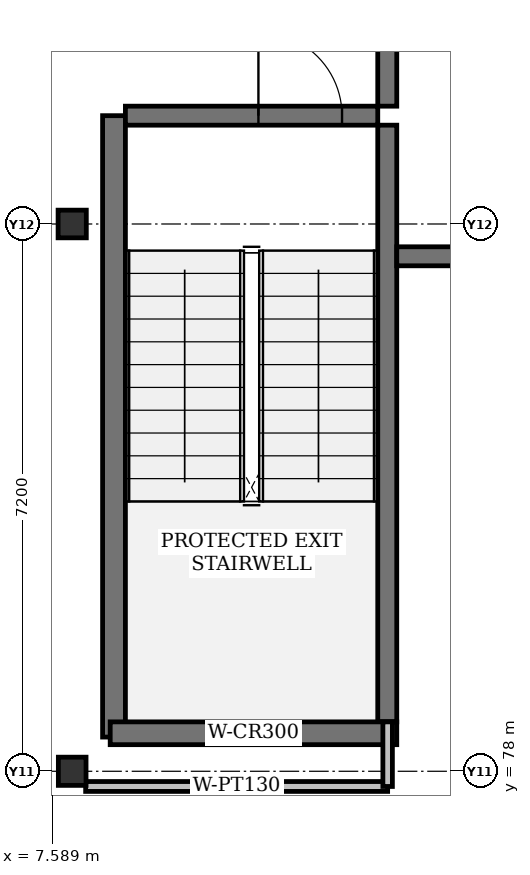
"""IFC4 building model, lengths in metres.
Left out: names, types, materials, properties, quantities, classifications, styles, units other than length and angle.
Written with IfcOpenShell. Run it as: python <this file> out.ifc"""

import sys

from ifc_helpers import new_model, si_unit, direction, frame, frame_2d, origin, origin_2d, place, context, subcontext, project, spatial, rectangle, i_section, extrude, element, fill, save


model = new_model("IFC4")
c1 = context("Model", 3, precision=1e-05, world=origin(), true_north=direction((0.0, 1.0)))
c2 = subcontext(c1, "Body", "Model", "MODEL_VIEW")
j1 = project(units=[si_unit("LENGTHUNIT", "METRE"), si_unit("PLANEANGLEUNIT", "RADIAN")], contexts=[c1])
p1 = place(None, origin())
s1 = spatial("IfcSite", under=j1, at=p1, CompositionType="ELEMENT")
p2 = place(p1, origin())
s2 = spatial("IfcBuilding", under=s1, at=p2, CompositionType="ELEMENT")
p3 = place(p2, frame((0.0, 0.0, 43.5)))
s3 = spatial("IfcBuildingStorey", under=s2, at=p3, CompositionType="ELEMENT", Elevation=43.5)
for number, where, z_axis, x_axis in (
    (1, (7.85, 78.0, 0.0), (0.0, 0.0, 1.0), (0.0, 1.0, 0.0)),
    (2, (7.85, 85.2, 0.0), (0.0, 0.0, 1.0), (1.0, 0.0, 0.0)),
):
    element("IfcColumn", number, at=place(p3, frame(where, z_axis=z_axis, x_axis=x_axis)), inside=s3, PredefinedType="COLUMN", context=c2, shape_type="SweptSolid", body=[
        extrude(i_section(OverallWidth=0.371, OverallDepth=0.364, WebThickness=0.013, FlangeThickness=0.022, FilletRadius=0.015, at=origin_2d()), origin(), (0.0, 0.0, 1.0), 4.2),
    ])
p4 = place(p3, frame((8.4, 78.45, 0.0), z_axis=(0.0, 0.0, 1.0), x_axis=(0.0, 1.0, 0.0)))
e3 = element("IfcWall", 3, at=p4, inside=s3, PredefinedType="SHEAR", context=c2, shape_type="SweptSolid", body=[
    extrude(rectangle(XDim=8.175, YDim=0.3, at=frame_2d((4.087, 0.0))), origin(), (0.0, 0.0, 1.0), 4.2),
])
p5 = place(p3, frame((11.995, 78.65, 0.0), z_axis=(0.0, 0.0, 1.0), x_axis=(0.0, 1.0, 0.0)))
e4 = element("IfcWall", 4, at=p5, inside=s3, PredefinedType="SHEAR", context=c2, shape_type="SweptSolid", body=[
    extrude(rectangle(XDim=7.85, YDim=0.25, at=frame_2d((3.925, 0.0))), origin(), (0.0, 0.0, 1.0), 4.2),
])
p6 = place(p3, frame((11.995, 86.75, 0.0), z_axis=(0.0, 0.0, 1.0), x_axis=(0.0, 1.0, 0.0)))
e5 = element("IfcWall", 5, at=p6, inside=s3, PredefinedType="SHEAR", context=c2, shape_type="SweptSolid", body=[
    extrude(rectangle(XDim=3.9, YDim=0.25, at=frame_2d((1.95, 0.0))), origin(), (0.0, 0.0, 1.0), 4.2),
])
p7 = place(p6, frame((1.3, 0.0, 0.0)))
e6 = element("IfcOpeningElement", 6, at=p7, cuts=e5, PredefinedType="OPENING", context=c2, shape_type="SweptSolid", body=[
    extrude(rectangle(XDim=1.25, YDim=2.2, at=frame_2d((0.625, 1.1))), frame((0.0, 0.125, 0.0), z_axis=(0.0, -1.0, 0.0), x_axis=(1.0, 0.0, 0.0)), (0.0, 0.0, 1.0), 0.25),
])
p8 = place(p3, frame((8.35, 78.5, 0.0), z_axis=(0.0, 0.0, 1.0), x_axis=(1.0, 0.0, 0.0)))
e7 = element("IfcWall", 7, at=p8, inside=s3, PredefinedType="SHEAR", context=c2, shape_type="SweptSolid", body=[
    extrude(rectangle(XDim=3.77, YDim=0.3, at=frame_2d((1.885, 0.0))), origin(), (0.0, 0.0, 1.0), 4.2),
])
p9 = place(p3, frame((8.55, 86.625, 0.0), z_axis=(0.0, 0.0, 1.0), x_axis=(1.0, 0.0, 0.0)))
e8 = element("IfcWall", 8, at=p9, inside=s3, PredefinedType="SHEAR", context=c2, shape_type="SweptSolid", body=[
    extrude(rectangle(XDim=3.32, YDim=0.25, at=frame_2d((1.66, 0.0))), origin(), (0.0, 0.0, 1.0), 4.2),
])
p10 = place(p9, frame((1.75, 0.0, 0.0)))
e9 = element("IfcOpeningElement", 9, at=p10, cuts=e8, PredefinedType="OPENING", context=c2, shape_type="SweptSolid", body=[
    extrude(rectangle(XDim=1.1, YDim=2.15, at=frame_2d((0.55, 1.075))), frame((0.0, 0.125, 0.0), z_axis=(0.0, -1.0, 0.0), x_axis=(1.0, 0.0, 0.0)), (0.0, 0.0, 1.0), 0.25),
])
p11 = place(p3, frame((12.12, 84.775, 0.0), z_axis=(0.0, 0.0, 1.0), x_axis=(1.0, 0.0, 0.0)))
e10 = element("IfcWall", 10, at=p11, inside=s3, PredefinedType="SHEAR", context=c2, shape_type="SweptSolid", body=[
    extrude(rectangle(XDim=4.03, YDim=0.25, at=frame_2d((2.015, 0.0))), origin(), (0.0, 0.0, 1.0), 4.2),
])
p12 = place(p11, frame((1.3, 0.0, 0.0)))
e11 = element("IfcOpeningElement", 11, at=p12, cuts=e10, PredefinedType="OPENING", context=c2, shape_type="SweptSolid", body=[
    extrude(rectangle(XDim=1.4, YDim=2.25, at=frame_2d((0.7, 1.125))), frame((0.0, 0.125, 0.0), z_axis=(0.0, -1.0, 0.0), x_axis=(1.0, 0.0, 0.0)), (0.0, 0.0, 1.0), 0.25),
])
p13 = place(p3, frame((8.027, 77.8, 0.0), z_axis=(0.0, 0.0, 1.0), x_axis=(1.0, 0.0, 0.0)))
e12 = element("IfcWall", 12, at=p13, inside=s3, PredefinedType="PARTITIONING", context=c2, shape_type="SweptSolid", body=[
    extrude(rectangle(XDim=3.973, YDim=0.13, at=frame_2d((1.986, 0.0))), origin(), (0.0, 0.0, 1.0), 3.426),
])
p14 = place(p3, frame((12.0, 77.8, 0.0), z_axis=(0.0, 0.0, 1.0), x_axis=(0.0, 1.0, 0.0)))
e13 = element("IfcWall", 13, at=p14, inside=s3, PredefinedType="PARTITIONING", context=c2, shape_type="SweptSolid", body=[
    extrude(rectangle(XDim=0.85, YDim=0.125, at=frame_2d((0.425, 0.0))), origin(), (0.0, 0.0, 1.0), 3.426),
])
p15 = place(p10, origin())
e14 = element("IfcDoor", 14, at=p15, inside=s3, OperationType="SINGLE_SWING_LEFT", PredefinedType="DOOR", context=c2, shape_type="SweptSolid", body=[
    extrude(rectangle(XDim=1.1, YDim=2.15, at=frame_2d((0.55, 1.075))), frame((0.0, 0.025, 0.0), z_axis=(0.0, -1.0, 0.0), x_axis=(1.0, 0.0, 0.0)), (0.0, 0.0, 1.0), 0.05),
])
fill(e9, e14)
save(model, sys.argv[1])
